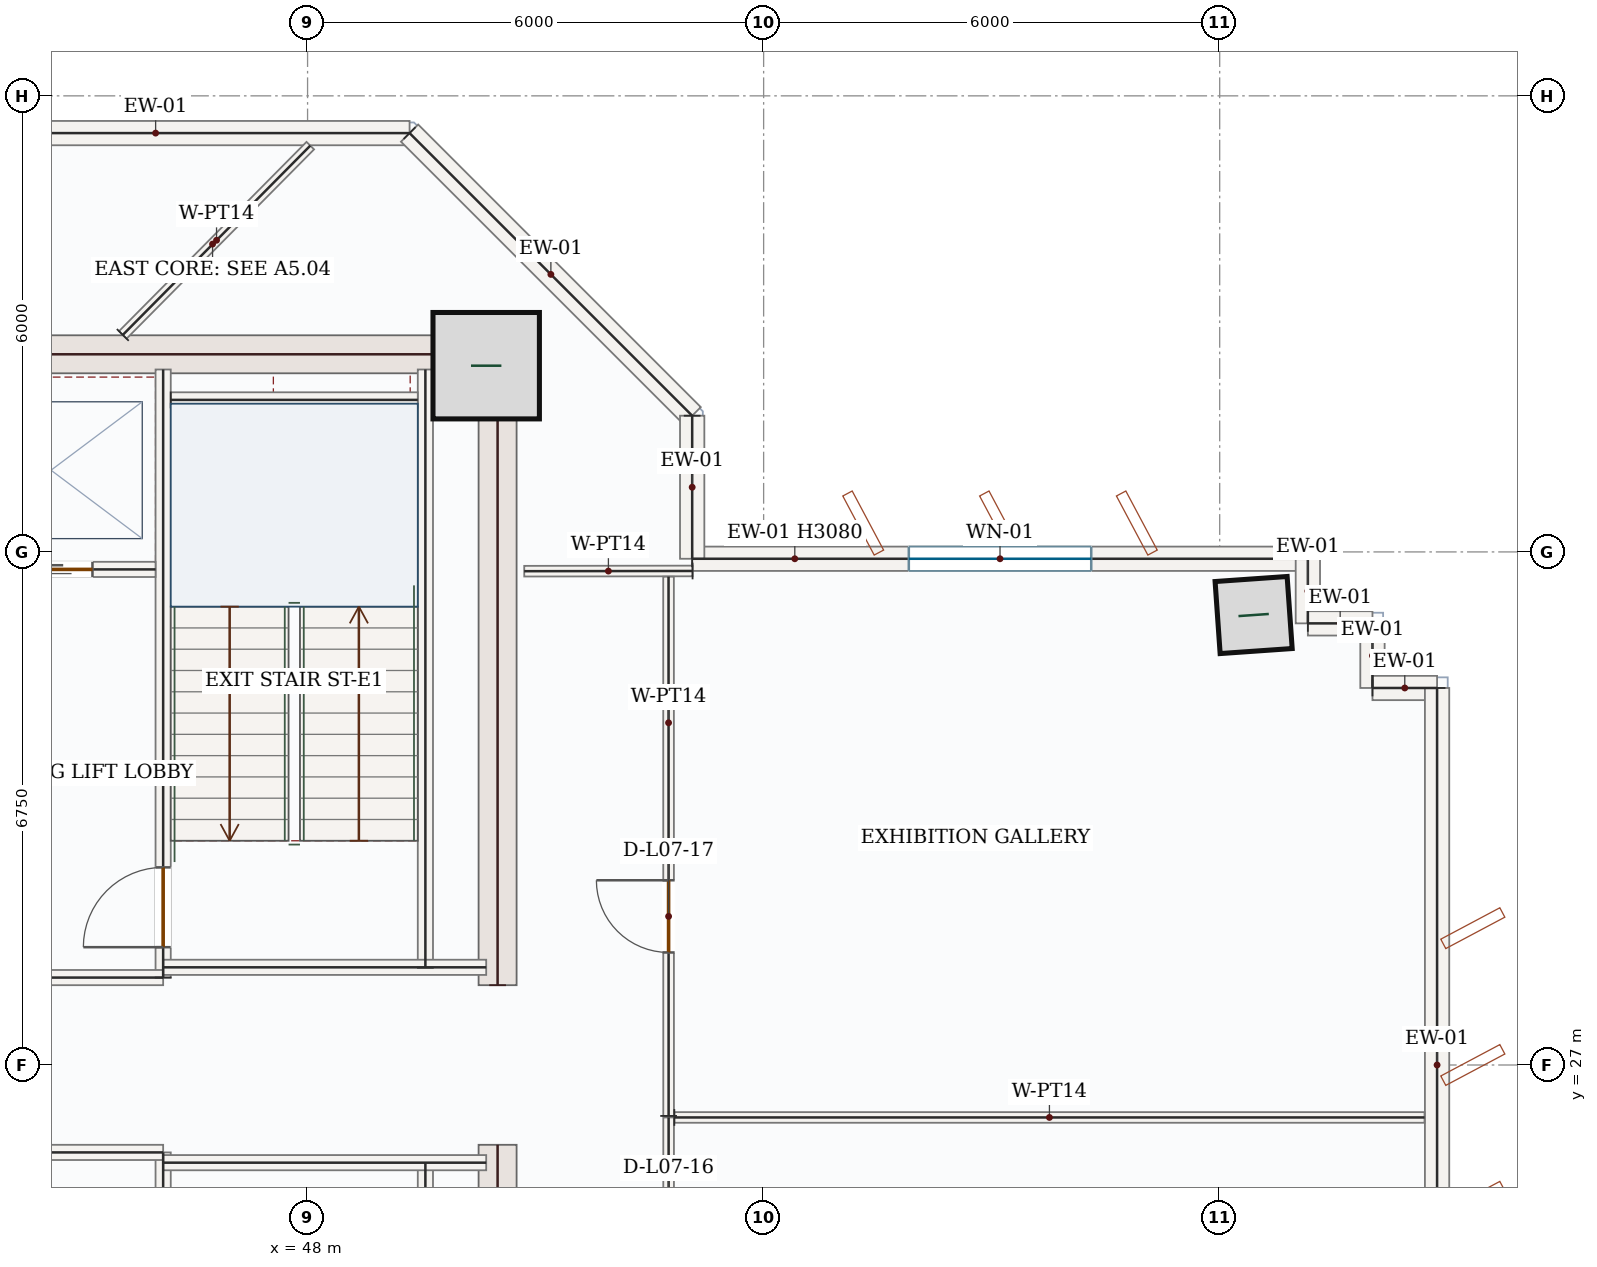
"""IFC4 building model, lengths in metres.
Left out: names, types, materials, properties, quantities, classifications, styles, units other than length and angle.
Written with IfcOpenShell. Run it as: python <this file> out.ifc"""

import sys

from ifc_helpers import new_model, si_unit, direction, frame, frame_2d, origin, origin_2d, place, context, subcontext, project, spatial, rectangle, hollow_rectangle, extrude, source, transform, mapped, element, fill, save


model = new_model("IFC4")
c1 = context("Model", 3, precision=1e-05, world=origin(), true_north=direction((0.0, 1.0)))
c2 = subcontext(c1, "Body", "Model", "MODEL_VIEW")
j1 = project(units=[si_unit("LENGTHUNIT", "METRE"), si_unit("PLANEANGLEUNIT", "RADIAN")], contexts=[c1])
p1 = place(None, origin())
s1 = spatial("IfcSite", under=j1, at=p1, CompositionType="ELEMENT")
p2 = place(p1, origin())
s2 = spatial("IfcBuilding", under=s1, at=p2, CompositionType="ELEMENT")
p3 = place(p2, frame((0.0, 0.0, 37.5)))
s3 = spatial("IfcBuildingStorey", under=s2, at=p3, CompositionType="ELEMENT", Elevation=37.5)
m1 = source(origin(), c2, "Body", "SweptSolid", [
    extrude(rectangle(XDim=8.55, YDim=0.5, at=frame_2d((4.275, 0.0))), origin(), (0.0, 0.0, 1.0), 3.95),
])
for number, where, z_axis, x_axis in (
    (1, (50.5, 17.4, 0.0), (0.0, 0.0, 1.0), (0.0, 1.0, 0.0)),
    (2, (50.5, 28.05, 0.0), (0.0, 0.0, 1.0), (0.0, 1.0, 0.0)),
):
    element("IfcWall", number, at=place(p3, frame(where, z_axis=z_axis, x_axis=x_axis)), inside=s3, PredefinedType="SHEAR", context=c2, shape_type="MappedRepresentation", body=[
        mapped(m1, transform((0.0, 0.0, 0.0), x_axis=(1.0, 0.0, 0.0), y_axis=(0.0, 1.0, 0.0), z_axis=(0.0, 0.0, 1.0), scale=1.0)),
    ])
m2 = source(origin(), c2, "Body", "SweptSolid", [
    extrude(rectangle(XDim=7.0, YDim=0.5, at=frame_2d((3.5, 0.0))), origin(), (0.0, 0.0, 1.0), 3.95),
])
p4 = place(p3, frame((43.25, 36.35, 0.0), z_axis=(0.0, 0.0, 1.0), x_axis=(1.0, 0.0, 0.0)))
e3 = element("IfcWall", 3, at=p4, inside=s3, PredefinedType="SHEAR", context=c2, shape_type="MappedRepresentation", body=[
    mapped(m2, transform((0.0, 0.0, 0.0), x_axis=(1.0, 0.0, 0.0), y_axis=(0.0, 1.0, 0.0), z_axis=(0.0, 0.0, 1.0), scale=1.0)),
])
m3 = source(origin(), c2, "Body", "SweptSolid", [
    extrude(rectangle(XDim=1.4, YDim=1.4, at=origin_2d()), origin(), (0.0, 0.0, 1.0), 4.2),
])
p5 = place(p3, frame((50.35, 36.2, 0.0), z_axis=(0.0, 0.0, 1.0), x_axis=(1.0, 0.0, 0.0)))
e4 = element("IfcColumn", 4, at=p5, inside=s3, PredefinedType="COLUMN", context=c2, shape_type="MappedRepresentation", body=[
    mapped(m3, transform((0.0, 0.0, 0.0), x_axis=(1.0, 0.0, 0.0), y_axis=(0.0, 1.0, 0.0), z_axis=(0.0, 0.0, 1.0), scale=1.0)),
])
m4 = source(origin(), c2, "Body", "SweptSolid", [
    extrude(hollow_rectangle(XDim=0.95, YDim=0.95, WallThickness=0.05, at=origin_2d()), origin(), (0.0, 0.0, 1.0), 4.2),
])
p6 = place(p3, frame((60.447, 32.92, 0.0), z_axis=(0.0, 0.0, 1.0), x_axis=(0.99756405026, 0.069756473744, 0.0)))
e5 = element("IfcColumn", 5, at=p6, inside=s3, PredefinedType="COLUMN", context=c2, shape_type="MappedRepresentation", body=[
    mapped(m4, transform((0.0, 0.0, 0.0), x_axis=(1.0, 0.0, 0.0), y_axis=(0.0, 1.0, 0.0), z_axis=(0.0, 0.0, 1.0), scale=1.0)),
])
p7 = place(p3, frame((53.06, 33.66, 0.0), z_axis=(0.0, 0.0, 1.0), x_axis=(1.0, 0.0, 0.0)))
e6 = element("IfcWall", 6, at=p7, inside=s3, PredefinedType="SOLIDWALL", context=c2, shape_type="SweptSolid", body=[
    extrude(rectangle(XDim=8.1, YDim=0.32, at=frame_2d((4.05, 0.0))), origin(), (0.0, 0.0, 1.0), 3.08),
])
p8 = place(p7, frame((2.85, 0.0, 0.85)))
e7 = element("IfcOpeningElement", 7, at=p8, cuts=e6, PredefinedType="OPENING", context=c2, shape_type="SweptSolid", body=[
    extrude(rectangle(XDim=2.4, YDim=1.8, at=frame_2d((1.2, 0.9))), frame((0.0, 0.17, 0.0), z_axis=(0.0, -1.0, 0.0), x_axis=(1.0, 0.0, 0.0)), (0.0, 0.0, 1.0), 0.34),
])
m5 = source(origin(), c2, "Body", "SweptSolid", [
    extrude(rectangle(XDim=0.85, YDim=0.32, at=frame_2d((0.425, 0.0))), origin(), (0.0, 0.0, 1.0), 3.95),
])
p9 = place(p3, frame((61.16, 33.66, 0.0), z_axis=(0.0, 0.0, 1.0), x_axis=(0.0, -1.0, 0.0)))
e8 = element("IfcWall", 8, at=p9, inside=s3, PredefinedType="SOLIDWALL", context=c2, shape_type="MappedRepresentation", body=[
    mapped(m5, transform((0.0, 0.0, 0.0), x_axis=(1.0, 0.0, 0.0), y_axis=(0.0, 1.0, 0.0), z_axis=(0.0, 0.0, 1.0), scale=1.0)),
])
m6 = source(origin(), c2, "Body", "SweptSolid", [
    extrude(rectangle(XDim=0.85, YDim=0.32, at=frame_2d((0.425, 0.0))), origin(), (0.0, 0.0, 1.0), 3.95),
])
for number, where, z_axis, x_axis in (
    (9, (61.16, 32.81, 0.0), (0.0, 0.0, 1.0), (1.0, 0.0, 0.0)),
    (10, (62.01, 32.81, 0.0), (0.0, 0.0, 1.0), (0.0, -1.0, 0.0)),
    (11, (62.01, 31.96, 0.0), (0.0, 0.0, 1.0), (1.0, 0.0, 0.0)),
):
    element("IfcWall", number, at=place(p3, frame(where, z_axis=z_axis, x_axis=x_axis)), inside=s3, PredefinedType="SOLIDWALL", context=c2, shape_type="MappedRepresentation", body=[
        mapped(m6, transform((0.0, 0.0, 0.0), x_axis=(1.0, 0.0, 0.0), y_axis=(0.0, 1.0, 0.0), z_axis=(0.0, 0.0, 1.0), scale=1.0)),
    ])
m7 = source(origin(), c2, "Body", "SweptSolid", [
    extrude(rectangle(XDim=9.92, YDim=0.32, at=frame_2d((4.96, 0.0))), origin(), (0.0, 0.0, 1.0), 3.95),
])
p10 = place(p3, frame((62.86, 31.96, 0.0), z_axis=(0.0, 0.0, 1.0), x_axis=(0.0, -1.0, 0.0)))
e12 = element("IfcWall", 12, at=p10, inside=s3, PredefinedType="SOLIDWALL", context=c2, shape_type="MappedRepresentation", body=[
    mapped(m7, transform((0.0, 0.0, 0.0), x_axis=(1.0, 0.0, 0.0), y_axis=(0.0, 1.0, 0.0), z_axis=(0.0, 0.0, 1.0), scale=1.0)),
])
m8 = source(origin(), c2, "Body", "SweptSolid", [
    extrude(rectangle(XDim=6.682, YDim=0.32, at=frame_2d((3.341, 0.0))), origin(), (0.0, 0.0, 1.0), 3.95),
])
p11 = place(p3, frame((42.66, 39.26, 0.0), z_axis=(0.0, 0.0, 1.0), x_axis=(1.0, 0.0, 0.0)))
e13 = element("IfcWall", 13, at=p11, inside=s3, PredefinedType="SOLIDWALL", context=c2, shape_type="MappedRepresentation", body=[
    mapped(m8, transform((0.0, 0.0, 0.0), x_axis=(1.0, 0.0, 0.0), y_axis=(0.0, 1.0, 0.0), z_axis=(0.0, 0.0, 1.0), scale=1.0)),
])
m9 = source(origin(), c2, "Body", "SweptSolid", [
    extrude(rectangle(XDim=5.258, YDim=0.32, at=frame_2d((2.629, 0.0))), origin(), (0.0, 0.0, 1.0), 3.95),
])
p12 = place(p3, frame((49.342, 39.26, 0.0), z_axis=(0.0, 0.0, 1.0), x_axis=(0.707106781187, -0.707106781187, 0.0)))
e14 = element("IfcWall", 14, at=p12, inside=s3, PredefinedType="SOLIDWALL", context=c2, shape_type="MappedRepresentation", body=[
    mapped(m9, transform((0.0, 0.0, 0.0), x_axis=(1.0, 0.0, 0.0), y_axis=(0.0, 1.0, 0.0), z_axis=(0.0, 0.0, 1.0), scale=1.0)),
])
m10 = source(origin(), c2, "Body", "SweptSolid", [
    extrude(rectangle(XDim=1.882, YDim=0.32, at=frame_2d((0.941, 0.0))), origin(), (0.0, 0.0, 1.0), 3.95),
])
p13 = place(p3, frame((53.06, 35.542, 0.0), z_axis=(0.0, 0.0, 1.0), x_axis=(0.0, -1.0, 0.0)))
e15 = element("IfcWall", 15, at=p13, inside=s3, PredefinedType="SOLIDWALL", context=c2, shape_type="MappedRepresentation", body=[
    mapped(m10, transform((0.0, 0.0, 0.0), x_axis=(1.0, 0.0, 0.0), y_axis=(0.0, 1.0, 0.0), z_axis=(0.0, 0.0, 1.0), scale=1.0)),
])
m11 = source(origin(), c2, "Body", "SweptSolid", [
    extrude(rectangle(XDim=7.87, YDim=0.2, at=frame_2d((3.935, 0.0))), origin(), (0.0, 0.0, 1.0), 3.95),
])
for number, where, z_axis, x_axis in (
    (16, (49.55, 17.85, 0.0), (0.0, 0.0, 1.0), (0.0, 1.0, 0.0)),
    (17, (49.55, 28.28, 0.0), (0.0, 0.0, 1.0), (0.0, 1.0, 0.0)),
):
    element("IfcWall", number, at=place(p3, frame(where, z_axis=z_axis, x_axis=x_axis)), inside=s3, PredefinedType="SOLIDWALL", context=c2, shape_type="MappedRepresentation", body=[
        mapped(m11, transform((0.0, 0.0, 0.0), x_axis=(1.0, 0.0, 0.0), y_axis=(0.0, 1.0, 0.0), z_axis=(0.0, 0.0, 1.0), scale=1.0)),
    ])
p14 = place(p3, frame((46.1, 17.85, 0.0), z_axis=(0.0, 0.0, 1.0), x_axis=(0.0, 1.0, 0.0)))
e18 = element("IfcWall", 18, at=p14, inside=s3, PredefinedType="SOLIDWALL", context=c2, shape_type="SweptSolid", body=[
    extrude(rectangle(XDim=8.0, YDim=0.2, at=frame_2d((4.0, 0.0))), origin(), (0.0, 0.0, 1.0), 3.95),
])
p15 = place(p14, frame((6.3, 0.0, 0.0)))
e19 = element("IfcOpeningElement", 19, at=p15, cuts=e18, PredefinedType="OPENING", context=c2, shape_type="SweptSolid", body=[
    extrude(rectangle(XDim=1.05, YDim=2.15, at=frame_2d((0.525, 1.075))), frame((0.0, 0.11, 0.0), z_axis=(0.0, -1.0, 0.0), x_axis=(1.0, 0.0, 0.0)), (0.0, 0.0, 1.0), 0.22),
])
p16 = place(p3, frame((46.1, 28.15, 0.0), z_axis=(0.0, 0.0, 1.0), x_axis=(0.0, 1.0, 0.0)))
e20 = element("IfcWall", 20, at=p16, inside=s3, PredefinedType="SOLIDWALL", context=c2, shape_type="SweptSolid", body=[
    extrude(rectangle(XDim=8.0, YDim=0.2, at=frame_2d((4.0, 0.0))), origin(), (0.0, 0.0, 1.0), 3.95),
])
p17 = place(p16, frame((0.4, 0.0, 0.0)))
e21 = element("IfcOpeningElement", 21, at=p17, cuts=e20, PredefinedType="OPENING", context=c2, shape_type="SweptSolid", body=[
    extrude(rectangle(XDim=1.05, YDim=2.15, at=frame_2d((0.525, 1.075))), frame((0.0, 0.11, 0.0), z_axis=(0.0, -1.0, 0.0), x_axis=(1.0, 0.0, 0.0)), (0.0, 0.0, 1.0), 0.22),
])
m12 = source(origin(), c2, "Body", "SweptSolid", [
    extrude(rectangle(XDim=3.0, YDim=0.2, at=frame_2d((1.5, 0.0))), origin(), (0.0, 0.0, 1.0), 3.95),
])
p18 = place(p3, frame((43.1, 25.85, 0.0), z_axis=(0.0, 0.0, 1.0), x_axis=(1.0, 0.0, 0.0)))
e22 = element("IfcWall", 22, at=p18, inside=s3, PredefinedType="SOLIDWALL", context=c2, shape_type="MappedRepresentation", body=[
    mapped(m12, transform((0.0, 0.0, 0.0), x_axis=(1.0, 0.0, 0.0), y_axis=(0.0, 1.0, 0.0), z_axis=(0.0, 0.0, 1.0), scale=1.0)),
])
m13 = source(origin(), c2, "Body", "SweptSolid", [
    extrude(rectangle(XDim=4.25, YDim=0.2, at=frame_2d((2.125, 0.0))), origin(), (0.0, 0.0, 1.0), 3.95),
])
p19 = place(p3, frame((46.1, 25.715, 0.0), z_axis=(0.0, 0.0, 1.0), x_axis=(1.0, 0.0, 0.0)))
e23 = element("IfcWall", 23, at=p19, inside=s3, PredefinedType="SOLIDWALL", context=c2, shape_type="MappedRepresentation", body=[
    mapped(m13, transform((0.0, 0.0, 0.0), x_axis=(1.0, 0.0, 0.0), y_axis=(0.0, 1.0, 0.0), z_axis=(0.0, 0.0, 1.0), scale=1.0)),
])
p20 = place(p3, frame((43.1, 28.15, 0.0), z_axis=(0.0, 0.0, 1.0), x_axis=(1.0, 0.0, 0.0)))
e24 = element("IfcWall", 24, at=p20, inside=s3, PredefinedType="SOLIDWALL", context=c2, shape_type="MappedRepresentation", body=[
    mapped(m12, transform((0.0, 0.0, 0.0), x_axis=(1.0, 0.0, 0.0), y_axis=(0.0, 1.0, 0.0), z_axis=(0.0, 0.0, 1.0), scale=1.0)),
])
p21 = place(p3, frame((46.1, 28.285, 0.0), z_axis=(0.0, 0.0, 1.0), x_axis=(1.0, 0.0, 0.0)))
e25 = element("IfcWall", 25, at=p21, inside=s3, PredefinedType="SOLIDWALL", context=c2, shape_type="MappedRepresentation", body=[
    mapped(m13, transform((0.0, 0.0, 0.0), x_axis=(1.0, 0.0, 0.0), y_axis=(0.0, 1.0, 0.0), z_axis=(0.0, 0.0, 1.0), scale=1.0)),
])
m14 = source(origin(), c2, "Body", "SweptSolid", [
    extrude(rectangle(XDim=3.25, YDim=0.2, at=frame_2d((1.625, 0.0))), origin(), (0.0, 0.0, 1.0), 3.95),
])
p22 = place(p3, frame((46.2, 35.75, 0.0), z_axis=(0.0, 0.0, 1.0), x_axis=(1.0, 0.0, 0.0)))
e26 = element("IfcWall", 26, at=p22, inside=s3, PredefinedType="SOLIDWALL", context=c2, shape_type="MappedRepresentation", body=[
    mapped(m14, transform((0.0, 0.0, 0.0), x_axis=(1.0, 0.0, 0.0), y_axis=(0.0, 1.0, 0.0), z_axis=(0.0, 0.0, 1.0), scale=1.0)),
])
p23 = place(p3, frame((43.25, 33.52, 0.0), z_axis=(0.0, 0.0, 1.0), x_axis=(1.0, 0.0, 0.0)))
e27 = element("IfcWall", 27, at=p23, inside=s3, PredefinedType="SOLIDWALL", context=c2, shape_type="SweptSolid", body=[
    extrude(rectangle(XDim=2.75, YDim=0.2, at=frame_2d((1.375, 0.0))), origin(), (0.0, 0.0, 1.0), 3.95),
])
p24 = place(p23, frame((0.82, 0.0, 0.0)))
e28 = element("IfcOpeningElement", 28, at=p24, cuts=e27, PredefinedType="OPENING", context=c2, shape_type="SweptSolid", body=[
    extrude(rectangle(XDim=1.1, YDim=2.15, at=frame_2d((0.55, 1.075))), frame((0.0, 0.11, 0.0), z_axis=(0.0, -1.0, 0.0), x_axis=(1.0, 0.0, 0.0)), (0.0, 0.0, 1.0), 0.22),
])
p25 = place(p3, frame((52.75, 20.575, 0.0), z_axis=(0.0, 0.0, 1.0), x_axis=(0.0, 1.0, 0.0)))
e29 = element("IfcWall", 29, at=p25, inside=s3, PredefinedType="PARTITIONING", context=c2, shape_type="SweptSolid", body=[
    extrude(rectangle(XDim=5.735, YDim=0.14, at=frame_2d((2.868, 0.0))), origin(), (0.0, 0.0, 1.0), 3.95),
])
p26 = place(p25, frame((3.732, 0.0, 0.0)))
e30 = element("IfcOpeningElement", 30, at=p26, cuts=e29, PredefinedType="OPENING", context=c2, shape_type="SweptSolid", body=[
    extrude(rectangle(XDim=0.95, YDim=2.15, at=frame_2d((0.475, 1.075))), frame((0.0, 0.08, 0.0), z_axis=(0.0, -1.0, 0.0), x_axis=(1.0, 0.0, 0.0)), (0.0, 0.0, 1.0), 0.16),
])
m15 = source(origin(), c2, "Body", "SweptSolid", [
    extrude(rectangle(XDim=9.87, YDim=0.14, at=frame_2d((4.935, 0.0))), origin(), (0.0, 0.0, 1.0), 3.95),
])
p27 = place(p3, frame((52.825, 26.31, 0.0), z_axis=(0.0, 0.0, 1.0), x_axis=(1.0, 0.0, 0.0)))
e31 = element("IfcWall", 31, at=p27, inside=s3, PredefinedType="PARTITIONING", context=c2, shape_type="MappedRepresentation", body=[
    mapped(m15, transform((0.0, 0.0, 0.0), x_axis=(1.0, 0.0, 0.0), y_axis=(0.0, 1.0, 0.0), z_axis=(0.0, 0.0, 1.0), scale=1.0)),
])
m16 = source(origin(), c2, "Body", "SweptSolid", [
    extrude(rectangle(XDim=2.214, YDim=0.14, at=frame_2d((1.107, 0.0))), origin(), (0.0, 0.0, 1.0), 3.95),
])
p28 = place(p3, frame((53.065, 33.5, 0.0), z_axis=(0.0, 0.0, 1.0), x_axis=(-0.99999912478, -0.001323041841, 0.0)))
e32 = element("IfcWall", 32, at=p28, inside=s3, PredefinedType="PARTITIONING", context=c2, shape_type="MappedRepresentation", body=[
    mapped(m16, transform((0.0, 0.0, 0.0), x_axis=(1.0, 0.0, 0.0), y_axis=(0.0, 1.0, 0.0), z_axis=(0.0, 0.0, 1.0), scale=1.0)),
])
m17 = source(origin(), c2, "Body", "SweptSolid", [
    extrude(rectangle(XDim=3.505, YDim=0.14, at=frame_2d((1.752, 0.0))), origin(), (0.0, 0.0, 1.0), 3.95),
])
p29 = place(p3, frame((45.569, 36.605, 0.0), z_axis=(0.0, 0.0, 1.0), x_axis=(0.703790445361, 0.710407635811, 0.0)))
e33 = element("IfcWall", 33, at=p29, inside=s3, PredefinedType="PARTITIONING", context=c2, shape_type="MappedRepresentation", body=[
    mapped(m17, transform((0.0, 0.0, 0.0), x_axis=(1.0, 0.0, 0.0), y_axis=(0.0, 1.0, 0.0), z_axis=(0.0, 0.0, 1.0), scale=1.0)),
])
p30 = place(p3, frame((52.75, 26.33, 0.0), z_axis=(0.0, 0.0, 1.0), x_axis=(-0.000137660459, 0.999999990525, 0.0)))
e34 = element("IfcWall", 34, at=p30, inside=s3, PredefinedType="PARTITIONING", context=c2, shape_type="SweptSolid", body=[
    extrude(rectangle(XDim=7.094, YDim=0.14, at=frame_2d((3.547, 0.0))), origin(), (0.0, 0.0, 1.0), 3.95),
])
p31 = place(p30, frame((2.15, 0.0, 0.0)))
e35 = element("IfcOpeningElement", 35, at=p31, cuts=e34, PredefinedType="OPENING", context=c2, shape_type="SweptSolid", body=[
    extrude(rectangle(XDim=0.95, YDim=2.15, at=frame_2d((0.475, 1.075))), frame((0.0, 0.08, 0.0), z_axis=(0.0, -1.0, 0.0), x_axis=(1.0, 0.0, 0.0)), (0.0, 0.0, 1.0), 0.16),
])
m18 = source(origin(), c2, "Body", "SweptSolid", [
    extrude(rectangle(XDim=2.4, YDim=1.8, at=frame_2d((1.2, 0.9))), frame((0.0, 0.03, 0.0), z_axis=(0.0, -1.0, 0.0), x_axis=(1.0, 0.0, 0.0)), (0.0, 0.0, 1.0), 0.06),
])
p32 = place(p8, origin())
e36 = element("IfcWindow", 36, at=p32, inside=s3, PartitioningType="DOUBLE_PANEL_VERTICAL", PredefinedType="WINDOW", context=c2, shape_type="MappedRepresentation", body=[
    mapped(m18, transform((0.0, 0.0, 0.0), x_axis=(1.0, 0.0, 0.0), y_axis=(0.0, 1.0, 0.0), z_axis=(0.0, 0.0, 1.0), scale=1.0)),
])
fill(e7, e36)
m19 = source(origin(), c2, "Body", "SweptSolid", [
    extrude(rectangle(XDim=1.05, YDim=2.15, at=frame_2d((0.525, 1.075))), frame((0.0, 0.025, 0.0), z_axis=(0.0, -1.0, 0.0), x_axis=(1.0, 0.0, 0.0)), (0.0, 0.0, 1.0), 0.05),
])
p33 = place(p17, origin())
e37 = element("IfcDoor", 37, at=p33, inside=s3, OperationType="SINGLE_SWING_LEFT", PredefinedType="DOOR", context=c2, shape_type="MappedRepresentation", body=[
    mapped(m19, transform((0.0, 0.0, 0.0), x_axis=(1.0, 0.0, 0.0), y_axis=(0.0, 1.0, 0.0), z_axis=(0.0, 0.0, 1.0), scale=1.0)),
])
fill(e21, e37)
m20 = source(origin(), c2, "Body", "SweptSolid", [
    extrude(rectangle(XDim=1.1, YDim=2.15, at=frame_2d((0.55, 1.075))), frame((0.0, 0.025, 0.0), z_axis=(0.0, -1.0, 0.0), x_axis=(1.0, 0.0, 0.0)), (0.0, 0.0, 1.0), 0.05),
])
p34 = place(p24, origin())
e38 = element("IfcDoor", 38, at=p34, inside=s3, OperationType="DOUBLE_DOOR_SLIDING", PredefinedType="DOOR", context=c2, shape_type="MappedRepresentation", body=[
    mapped(m20, transform((0.0, 0.0, 0.0), x_axis=(1.0, 0.0, 0.0), y_axis=(0.0, 1.0, 0.0), z_axis=(0.0, 0.0, 1.0), scale=1.0)),
])
fill(e28, e38)
m21 = source(origin(), c2, "Body", "SweptSolid", [
    extrude(rectangle(XDim=0.95, YDim=2.15, at=frame_2d((0.475, 1.075))), frame((0.0, 0.025, 0.0), z_axis=(0.0, -1.0, 0.0), x_axis=(1.0, 0.0, 0.0)), (0.0, 0.0, 1.0), 0.05),
])
p35 = place(p31, origin())
e39 = element("IfcDoor", 39, at=p35, inside=s3, OperationType="SINGLE_SWING_RIGHT", PredefinedType="DOOR", context=c2, shape_type="MappedRepresentation", body=[
    mapped(m21, transform((0.0, 0.0, 0.0), x_axis=(1.0, 0.0, 0.0), y_axis=(0.0, 1.0, 0.0), z_axis=(0.0, 0.0, 1.0), scale=1.0)),
])
fill(e35, e39)
save(model, sys.argv[1])
